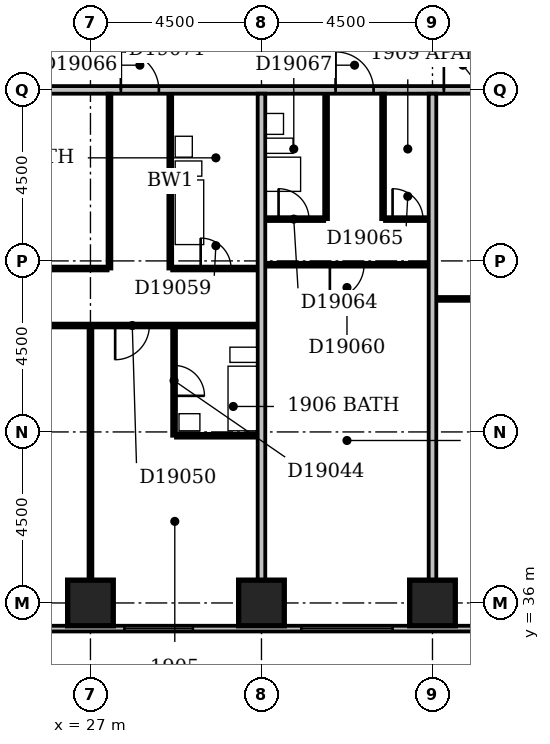
"""IFC4 building model, lengths in metres.
Left out: names, types, materials, properties, quantities, classifications, styles, units other than length and angle.
Written with IfcOpenShell. Run it as: python <this file> out.ifc"""

import sys

from ifc_helpers import new_model, si_unit, direction, frame, frame_2d, origin, origin_2d, place, context, subcontext, project, spatial, rectangle, extrude, element, fill, save


model = new_model("IFC4")
c1 = context("Model", 3, precision=1e-05, world=origin(), true_north=direction((0.0, 1.0)))
c2 = subcontext(c1, "Body", "Model", "MODEL_VIEW")
j1 = project(units=[si_unit("LENGTHUNIT", "METRE"), si_unit("PLANEANGLEUNIT", "RADIAN")], contexts=[c1])
p1 = place(None, origin())
s1 = spatial("IfcSite", under=j1, at=p1, CompositionType="ELEMENT")
p2 = place(p1, origin())
s2 = spatial("IfcBuilding", under=s1, at=p2, CompositionType="ELEMENT")
p3 = place(p2, frame((0.0, 0.0, 79.4)))
s3 = spatial("IfcBuildingStorey", under=s2, at=p3, CompositionType="ELEMENT", Elevation=79.4)
for number, where, z_axis, x_axis in (
    (1, (27.0, 36.0, -0.3), (0.0, 0.0, 1.0), (1.0, 0.0, 0.0)),
    (2, (31.5, 36.0, -0.3), (0.0, 0.0, 1.0), (1.0, 0.0, 0.0)),
    (3, (36.0, 36.0, -0.3), (0.0, 0.0, 1.0), (1.0, 0.0, 0.0)),
):
    element("IfcColumn", number, at=place(p3, frame(where, z_axis=z_axis, x_axis=x_axis)), inside=s3, PredefinedType="COLUMN", context=c2, shape_type="SweptSolid", body=[
        extrude(rectangle(XDim=1.2, YDim=1.2, at=origin_2d()), origin(), (0.0, 0.0, 1.0), 3.6),
    ])
p4 = place(p3, frame((23.1, 35.325, 0.0), z_axis=(0.0, 0.0, 1.0), x_axis=(1.0, 0.0, 0.0)))
e4 = element("IfcWall", 4, at=p4, inside=s3, PredefinedType="STANDARD", context=c2, shape_type="SweptSolid", body=[
    extrude(rectangle(XDim=45.15, YDim=0.15, at=frame_2d((22.575, 0.0))), origin(), (0.0, 0.0, 1.0), 2.7),
])
p5 = place(p4, frame((0.45, 0.0, 0.6)))
e5 = element("IfcOpeningElement", 5, at=p5, cuts=e4, PredefinedType="OPENING", context=c2, shape_type="SweptSolid", body=[
    extrude(rectangle(XDim=2.4, YDim=1.8, at=frame_2d((1.2, 0.9))), frame((0.0, 0.087, 0.0), z_axis=(0.0, -1.0, 0.0), x_axis=(1.0, 0.0, 0.0)), (0.0, 0.0, 1.0), 0.174),
])
p6 = place(p4, frame((4.793, 0.0, 0.6)))
e6 = element("IfcOpeningElement", 6, at=p6, cuts=e4, PredefinedType="OPENING", context=c2, shape_type="SweptSolid", body=[
    extrude(rectangle(XDim=1.8, YDim=1.8, at=frame_2d((0.9, 0.9))), frame((0.0, 0.087, 0.0), z_axis=(0.0, -1.0, 0.0), x_axis=(1.0, 0.0, 0.0)), (0.0, 0.0, 1.0), 0.174),
])
p7 = place(p4, frame((9.45, 0.0, 0.6)))
e7 = element("IfcOpeningElement", 7, at=p7, cuts=e4, PredefinedType="OPENING", context=c2, shape_type="SweptSolid", body=[
    extrude(rectangle(XDim=2.4, YDim=1.8, at=frame_2d((1.2, 0.9))), frame((0.0, 0.087, 0.0), z_axis=(0.0, -1.0, 0.0), x_axis=(1.0, 0.0, 0.0)), (0.0, 0.0, 1.0), 0.174),
])
p8 = place(p4, frame((13.95, 0.0, 0.6)))
e8 = element("IfcOpeningElement", 8, at=p8, cuts=e4, PredefinedType="OPENING", context=c2, shape_type="SweptSolid", body=[
    extrude(rectangle(XDim=2.4, YDim=1.8, at=frame_2d((1.2, 0.9))), frame((0.0, 0.087, 0.0), z_axis=(0.0, -1.0, 0.0), x_axis=(1.0, 0.0, 0.0)), (0.0, 0.0, 1.0), 0.174),
])
p9 = place(p4, frame((19.597, 0.0, 0.6)))
e9 = element("IfcOpeningElement", 9, at=p9, cuts=e4, PredefinedType="OPENING", context=c2, shape_type="SweptSolid", body=[
    extrude(rectangle(XDim=1.5, YDim=1.8, at=frame_2d((0.75, 0.9))), frame((0.0, 0.087, 0.0), z_axis=(0.0, -1.0, 0.0), x_axis=(1.0, 0.0, 0.0)), (0.0, 0.0, 1.0), 0.174),
])
p10 = place(p4, frame((22.95, 0.0, 0.6)))
e10 = element("IfcOpeningElement", 10, at=p10, cuts=e4, PredefinedType="OPENING", context=c2, shape_type="SweptSolid", body=[
    extrude(rectangle(XDim=2.4, YDim=1.8, at=frame_2d((1.2, 0.9))), frame((0.0, 0.087, 0.0), z_axis=(0.0, -1.0, 0.0), x_axis=(1.0, 0.0, 0.0)), (0.0, 0.0, 1.0), 0.174),
])
p11 = place(p4, frame((27.45, 0.0, 0.6)))
e11 = element("IfcOpeningElement", 11, at=p11, cuts=e4, PredefinedType="OPENING", context=c2, shape_type="SweptSolid", body=[
    extrude(rectangle(XDim=2.4, YDim=1.8, at=frame_2d((1.2, 0.9))), frame((0.0, 0.087, 0.0), z_axis=(0.0, -1.0, 0.0), x_axis=(1.0, 0.0, 0.0)), (0.0, 0.0, 1.0), 0.174),
])
p12 = place(p4, frame((31.95, 0.0, 0.6)))
e12 = element("IfcOpeningElement", 12, at=p12, cuts=e4, PredefinedType="OPENING", context=c2, shape_type="SweptSolid", body=[
    extrude(rectangle(XDim=2.4, YDim=1.8, at=frame_2d((1.2, 0.9))), frame((0.0, 0.087, 0.0), z_axis=(0.0, -1.0, 0.0), x_axis=(1.0, 0.0, 0.0)), (0.0, 0.0, 1.0), 0.174),
])
p13 = place(p4, frame((37.861, 0.0, 0.6)))
e13 = element("IfcOpeningElement", 13, at=p13, cuts=e4, PredefinedType="OPENING", context=c2, shape_type="SweptSolid", body=[
    extrude(rectangle(XDim=1.2, YDim=1.8, at=frame_2d((0.6, 0.9))), frame((0.0, 0.087, 0.0), z_axis=(0.0, -1.0, 0.0), x_axis=(1.0, 0.0, 0.0)), (0.0, 0.0, 1.0), 0.174),
])
p14 = place(p4, frame((40.95, 0.0, 0.6)))
e14 = element("IfcOpeningElement", 14, at=p14, cuts=e4, PredefinedType="OPENING", context=c2, shape_type="SweptSolid", body=[
    extrude(rectangle(XDim=2.4, YDim=1.8, at=frame_2d((1.2, 0.9))), frame((0.0, 0.087, 0.0), z_axis=(0.0, -1.0, 0.0), x_axis=(1.0, 0.0, 0.0)), (0.0, 0.0, 1.0), 0.174),
])
p15 = place(p3, frame((27.0, 36.6, 0.0), z_axis=(0.0, 0.0, 1.0), x_axis=(0.0, 1.0, 0.0)))
e15 = element("IfcWall", 15, at=p15, inside=s3, PredefinedType="PARTITIONING", context=c2, shape_type="SweptSolid", body=[
    extrude(rectangle(XDim=6.65, YDim=0.1, at=frame_2d((3.325, 0.0))), origin(), (0.0, 0.0, 1.0), 2.6),
])
p16 = place(p3, frame((31.5, 36.6, 0.0), z_axis=(0.0, 0.0, 1.0), x_axis=(0.0, 1.0, 0.0)))
e16 = element("IfcWall", 16, at=p16, inside=s3, PredefinedType="PARTITIONING", context=c2, shape_type="SweptSolid", body=[
    extrude(rectangle(XDim=12.8, YDim=0.2, at=frame_2d((6.4, 0.0))), origin(), (0.0, 0.0, 1.0), 3.3),
])
p17 = place(p3, frame((36.0, 36.6, 0.0), z_axis=(0.0, 0.0, 1.0), x_axis=(0.0, 1.0, 0.0)))
e17 = element("IfcWall", 17, at=p17, inside=s3, PredefinedType="PARTITIONING", context=c2, shape_type="SweptSolid", body=[
    extrude(rectangle(XDim=12.8, YDim=0.2, at=frame_2d((6.4, 0.0))), origin(), (0.0, 0.0, 1.0), 2.4),
])
p18 = place(p3, frame((29.2, 40.4, 0.0), z_axis=(0.0, 0.0, 1.0), x_axis=(0.0, 1.0, 0.0)))
e18 = element("IfcWall", 18, at=p18, inside=s3, PredefinedType="PLUMBINGWALL", context=c2, shape_type="SweptSolid", body=[
    extrude(rectangle(XDim=2.85, YDim=0.1, at=frame_2d((1.425, 0.0))), origin(), (0.0, 0.0, 1.0), 3.3),
])
p19 = place(p18, frame((1.05, 0.0, 0.0)))
e19 = element("IfcOpeningElement", 19, at=p19, cuts=e18, PredefinedType="OPENING", context=c2, shape_type="SweptSolid", body=[
    extrude(rectangle(XDim=0.8, YDim=2.1, at=frame_2d((0.4, 1.05))), frame((0.0, 0.062, 0.0), z_axis=(0.0, -1.0, 0.0), x_axis=(1.0, 0.0, 0.0)), (0.0, 0.0, 1.0), 0.124),
])
p20 = place(p3, frame((29.25, 40.4, 0.0), z_axis=(0.0, 0.0, 1.0), x_axis=(1.0, 0.0, 0.0)))
e20 = element("IfcWall", 20, at=p20, inside=s3, PredefinedType="PLUMBINGWALL", context=c2, shape_type="SweptSolid", body=[
    extrude(rectangle(XDim=2.15, YDim=0.1, at=frame_2d((1.075, 0.0))), origin(), (0.0, 0.0, 1.0), 3.3),
])
p21 = place(p3, frame((22.6, 43.3, 0.0), z_axis=(0.0, 0.0, 1.0), x_axis=(1.0, 0.0, 0.0)))
e21 = element("IfcWall", 21, at=p21, inside=s3, PredefinedType="PARTITIONING", context=c2, shape_type="SweptSolid", body=[
    extrude(rectangle(XDim=8.8, YDim=0.1, at=frame_2d((4.4, 0.0))), origin(), (0.0, 0.0, 1.0), 3.3),
])
p22 = place(p21, frame((1.7, 0.0, 0.0)))
e22 = element("IfcOpeningElement", 22, at=p22, cuts=e21, PredefinedType="OPENING", context=c2, shape_type="SweptSolid", body=[
    extrude(rectangle(XDim=0.9, YDim=2.1, at=frame_2d((0.45, 1.05))), frame((0.0, 0.062, 0.0), z_axis=(0.0, -1.0, 0.0), x_axis=(1.0, 0.0, 0.0)), (0.0, 0.0, 1.0), 0.124),
])
p23 = place(p21, frame((5.05, 0.0, 0.0)))
e23 = element("IfcOpeningElement", 23, at=p23, cuts=e21, PredefinedType="OPENING", context=c2, shape_type="SweptSolid", body=[
    extrude(rectangle(XDim=0.9, YDim=2.1, at=frame_2d((0.45, 1.05))), frame((0.0, 0.062, 0.0), z_axis=(0.0, -1.0, 0.0), x_axis=(1.0, 0.0, 0.0)), (0.0, 0.0, 1.0), 0.124),
])
p24 = place(p3, frame((36.1, 44.0, 0.0), z_axis=(0.0, 0.0, 1.0), x_axis=(1.0, 0.0, 0.0)))
e24 = element("IfcWall", 24, at=p24, inside=s3, PredefinedType="PARTITIONING", context=c2, shape_type="SweptSolid", body=[
    extrude(rectangle(XDim=13.3, YDim=0.1, at=frame_2d((6.65, 0.0))), origin(), (0.0, 0.0, 1.0), 3.3),
])
p25 = place(p24, frame((3.9, 0.0, 0.0)))
e25 = element("IfcOpeningElement", 25, at=p25, cuts=e24, PredefinedType="OPENING", context=c2, shape_type="SweptSolid", body=[
    extrude(rectangle(XDim=0.9, YDim=2.1, at=frame_2d((0.45, 1.05))), frame((0.0, 0.062, 0.0), z_axis=(0.0, -1.0, 0.0), x_axis=(1.0, 0.0, 0.0)), (0.0, 0.0, 1.0), 0.124),
])
p26 = place(p24, frame((10.7, 0.0, 0.0)))
e26 = element("IfcOpeningElement", 26, at=p26, cuts=e24, PredefinedType="OPENING", context=c2, shape_type="SweptSolid", body=[
    extrude(rectangle(XDim=0.9, YDim=2.1, at=frame_2d((0.45, 1.05))), frame((0.0, 0.062, 0.0), z_axis=(0.0, -1.0, 0.0), x_axis=(1.0, 0.0, 0.0)), (0.0, 0.0, 1.0), 0.124),
])
p27 = place(p3, frame((22.6, 44.8, 0.0), z_axis=(0.0, 0.0, 1.0), x_axis=(1.0, 0.0, 0.0)))
e27 = element("IfcWall", 27, at=p27, inside=s3, PredefinedType="PARTITIONING", context=c2, shape_type="SweptSolid", body=[
    extrude(rectangle(XDim=4.85, YDim=0.1, at=frame_2d((2.425, 0.0))), origin(), (0.0, 0.0, 1.0), 3.3),
])
p28 = place(p27, frame((1.95, 0.0, 0.0)))
e28 = element("IfcOpeningElement", 28, at=p28, cuts=e27, PredefinedType="OPENING", context=c2, shape_type="SweptSolid", body=[
    extrude(rectangle(XDim=0.9, YDim=2.1, at=frame_2d((0.45, 1.05))), frame((0.0, 0.062, 0.0), z_axis=(0.0, -1.0, 0.0), x_axis=(1.0, 0.0, 0.0)), (0.0, 0.0, 1.0), 0.124),
])
p29 = place(p3, frame((27.5, 44.8, 0.0), z_axis=(0.0, 0.0, 1.0), x_axis=(0.0, 1.0, 0.0)))
e29 = element("IfcWall", 29, at=p29, inside=s3, PredefinedType="PARTITIONING", context=c2, shape_type="SweptSolid", body=[
    extrude(rectangle(XDim=4.6, YDim=0.1, at=frame_2d((2.3, 0.0))), origin(), (0.0, 0.0, 1.0), 2.6),
])
p30 = place(p3, frame((29.1, 44.8, 0.0), z_axis=(0.0, 0.0, 1.0), x_axis=(0.0, 1.0, 0.0)))
e30 = element("IfcWall", 30, at=p30, inside=s3, PredefinedType="PLUMBINGWALL", context=c2, shape_type="SweptSolid", body=[
    extrude(rectangle(XDim=4.6, YDim=0.1, at=frame_2d((2.3, 0.0))), origin(), (0.0, 0.0, 1.0), 3.3),
])
p31 = place(p3, frame((29.15, 44.8, 0.0), z_axis=(0.0, 0.0, 1.0), x_axis=(1.0, 0.0, 0.0)))
e31 = element("IfcWall", 31, at=p31, inside=s3, PredefinedType="PARTITIONING", context=c2, shape_type="SweptSolid", body=[
    extrude(rectangle(XDim=2.25, YDim=0.1, at=frame_2d((1.125, 0.0))), origin(), (0.0, 0.0, 1.0), 3.3),
])
p32 = place(p31, frame((0.75, 0.0, 0.0)))
e32 = element("IfcOpeningElement", 32, at=p32, cuts=e31, PredefinedType="OPENING", context=c2, shape_type="SweptSolid", body=[
    extrude(rectangle(XDim=0.8, YDim=2.1, at=frame_2d((0.4, 1.05))), frame((0.0, 0.062, 0.0), z_axis=(0.0, -1.0, 0.0), x_axis=(1.0, 0.0, 0.0)), (0.0, 0.0, 1.0), 0.124),
])
p33 = place(p3, frame((31.6, 44.9, 0.0), z_axis=(0.0, 0.0, 1.0), x_axis=(1.0, 0.0, 0.0)))
e33 = element("IfcWall", 33, at=p33, inside=s3, PredefinedType="PARTITIONING", context=c2, shape_type="SweptSolid", body=[
    extrude(rectangle(XDim=4.3, YDim=0.1, at=frame_2d((2.15, 0.0))), origin(), (0.0, 0.0, 1.0), 3.3),
])
p34 = place(p33, frame((1.7, 0.0, 0.0)))
e34 = element("IfcOpeningElement", 34, at=p34, cuts=e33, PredefinedType="OPENING", context=c2, shape_type="SweptSolid", body=[
    extrude(rectangle(XDim=0.9, YDim=2.1, at=frame_2d((0.45, 1.05))), frame((0.0, 0.062, 0.0), z_axis=(0.0, -1.0, 0.0), x_axis=(1.0, 0.0, 0.0)), (0.0, 0.0, 1.0), 0.124),
])
p35 = place(p3, frame((31.6, 46.1, 0.0), z_axis=(0.0, 0.0, 1.0), x_axis=(1.0, 0.0, 0.0)))
e35 = element("IfcWall", 35, at=p35, inside=s3, PredefinedType="PARTITIONING", context=c2, shape_type="SweptSolid", body=[
    extrude(rectangle(XDim=1.55, YDim=0.1, at=frame_2d((0.775, 0.0))), origin(), (0.0, 0.0, 1.0), 3.3),
])
p36 = place(p35, frame((0.35, 0.0, 0.0)))
e36 = element("IfcOpeningElement", 36, at=p36, cuts=e35, PredefinedType="OPENING", context=c2, shape_type="SweptSolid", body=[
    extrude(rectangle(XDim=0.8, YDim=2.1, at=frame_2d((0.4, 1.05))), frame((0.0, 0.062, 0.0), z_axis=(0.0, -1.0, 0.0), x_axis=(1.0, 0.0, 0.0)), (0.0, 0.0, 1.0), 0.124),
])
p37 = place(p3, frame((33.2, 46.1, 0.0), z_axis=(0.0, 0.0, 1.0), x_axis=(0.0, 1.0, 0.0)))
e37 = element("IfcWall", 37, at=p37, inside=s3, PredefinedType="PLUMBINGWALL", context=c2, shape_type="SweptSolid", body=[
    extrude(rectangle(XDim=3.3, YDim=0.1, at=frame_2d((1.65, 0.0))), origin(), (0.0, 0.0, 1.0), 3.3),
])
p38 = place(p3, frame((34.7, 46.1, 0.0), z_axis=(0.0, 0.0, 1.0), x_axis=(0.0, 1.0, 0.0)))
e38 = element("IfcWall", 38, at=p38, inside=s3, PredefinedType="PARTITIONING", context=c2, shape_type="SweptSolid", body=[
    extrude(rectangle(XDim=3.3, YDim=0.1, at=frame_2d((1.65, 0.0))), origin(), (0.0, 0.0, 1.0), 3.3),
])
p39 = place(p3, frame((34.75, 46.1, 0.0), z_axis=(0.0, 0.0, 1.0), x_axis=(1.0, 0.0, 0.0)))
e39 = element("IfcWall", 39, at=p39, inside=s3, PredefinedType="PARTITIONING", context=c2, shape_type="SweptSolid", body=[
    extrude(rectangle(XDim=1.15, YDim=0.1, at=frame_2d((0.575, 0.0))), origin(), (0.0, 0.0, 1.0), 3.3),
])
p40 = place(p39, frame((0.2, 0.0, 0.0)))
e40 = element("IfcOpeningElement", 40, at=p40, cuts=e39, PredefinedType="OPENING", context=c2, shape_type="SweptSolid", body=[
    extrude(rectangle(XDim=0.8, YDim=2.1, at=frame_2d((0.4, 1.05))), frame((0.0, 0.062, 0.0), z_axis=(0.0, -1.0, 0.0), x_axis=(1.0, 0.0, 0.0)), (0.0, 0.0, 1.0), 0.124),
])
p41 = place(p3, frame((9.1, 49.5, 0.0), z_axis=(0.0, 0.0, 1.0), x_axis=(1.0, 0.0, 0.0)))
e41 = element("IfcWall", 41, at=p41, inside=s3, PredefinedType="PARTITIONING", context=c2, shape_type="SweptSolid", body=[
    extrude(rectangle(XDim=57.8, YDim=0.2, at=frame_2d((28.9, 0.0))), origin(), (0.0, 0.0, 1.0), 3.3),
])
p42 = place(p41, frame((18.7, 0.0, 0.0)))
e42 = element("IfcOpeningElement", 42, at=p42, cuts=e41, PredefinedType="OPENING", context=c2, shape_type="SweptSolid", body=[
    extrude(rectangle(XDim=1.0, YDim=2.1, at=frame_2d((0.5, 1.05))), frame((0.0, 0.112, 0.0), z_axis=(0.0, -1.0, 0.0), x_axis=(1.0, 0.0, 0.0)), (0.0, 0.0, 1.0), 0.224),
])
p43 = place(p41, frame((24.35, 0.0, 0.0)))
e43 = element("IfcOpeningElement", 43, at=p43, cuts=e41, PredefinedType="OPENING", context=c2, shape_type="SweptSolid", body=[
    extrude(rectangle(XDim=1.0, YDim=2.1, at=frame_2d((0.5, 1.05))), frame((0.0, 0.112, 0.0), z_axis=(0.0, -1.0, 0.0), x_axis=(1.0, 0.0, 0.0)), (0.0, 0.0, 1.0), 0.224),
])
p44 = place(p41, frame((27.2, 0.0, 0.0)))
e44 = element("IfcOpeningElement", 44, at=p44, cuts=e41, PredefinedType="OPENING", context=c2, shape_type="SweptSolid", body=[
    extrude(rectangle(XDim=1.0, YDim=2.1, at=frame_2d((0.5, 1.05))), frame((0.0, 0.112, 0.0), z_axis=(0.0, -1.0, 0.0), x_axis=(1.0, 0.0, 0.0)), (0.0, 0.0, 1.0), 0.224),
])
p45 = place(p41, frame((43.1, 0.0, 0.0)))
e45 = element("IfcOpeningElement", 45, at=p45, cuts=e41, PredefinedType="OPENING", context=c2, shape_type="SweptSolid", body=[
    extrude(rectangle(XDim=1.0, YDim=2.1, at=frame_2d((0.5, 1.05))), frame((0.0, 0.112, 0.0), z_axis=(0.0, -1.0, 0.0), x_axis=(1.0, 0.0, 0.0)), (0.0, 0.0, 1.0), 0.224),
])
p46 = place(p41, frame((3.9, 0.0, 0.0)))
e46 = element("IfcOpeningElement", 46, at=p46, cuts=e41, PredefinedType="OPENING", context=c2, shape_type="SweptSolid", body=[
    extrude(rectangle(XDim=0.9, YDim=2.1, at=frame_2d((0.45, 1.05))), frame((0.0, 0.112, 0.0), z_axis=(0.0, -1.0, 0.0), x_axis=(1.0, 0.0, 0.0)), (0.0, 0.0, 1.0), 0.224),
])
p47 = place(p6, origin())
e47 = element("IfcWindow", 47, at=p47, inside=s3, PartitioningType="SINGLE_PANEL", PredefinedType="WINDOW", context=c2, shape_type="SweptSolid", body=[
    extrude(rectangle(XDim=1.8, YDim=1.8, at=frame_2d((0.9, 0.9))), frame((0.0, 0.03, 0.0), z_axis=(0.0, -1.0, 0.0), x_axis=(1.0, 0.0, 0.0)), (0.0, 0.0, 1.0), 0.06),
])
fill(e6, e47)
p48 = place(p7, origin())
e48 = element("IfcWindow", 48, at=p48, inside=s3, PartitioningType="SINGLE_PANEL", PredefinedType="WINDOW", context=c2, shape_type="SweptSolid", body=[
    extrude(rectangle(XDim=2.4, YDim=1.8, at=frame_2d((1.2, 0.9))), frame((0.0, 0.03, 0.0), z_axis=(0.0, -1.0, 0.0), x_axis=(1.0, 0.0, 0.0)), (0.0, 0.0, 1.0), 0.06),
])
fill(e7, e48)
p49 = place(p19, frame((0.8, 0.0, 0.0), z_axis=(0.0, 0.0, 1.0), x_axis=(-1.0, 0.0, 0.0)))
e49 = element("IfcDoor", 49, at=p49, inside=s3, OperationType="SINGLE_SWING_RIGHT", PredefinedType="DOOR", context=c2, shape_type="SweptSolid", body=[
    extrude(rectangle(XDim=0.8, YDim=2.1, at=frame_2d((0.4, 1.05))), frame((0.0, 0.025, 0.0), z_axis=(0.0, -1.0, 0.0), x_axis=(1.0, 0.0, 0.0)), (0.0, 0.0, 1.0), 0.05),
])
fill(e19, e49)
p50 = place(p23, frame((0.9, 0.0, 0.0), z_axis=(0.0, 0.0, 1.0), x_axis=(-1.0, 0.0, 0.0)))
e50 = element("IfcDoor", 50, at=p50, inside=s3, OperationType="SINGLE_SWING_RIGHT", PredefinedType="DOOR", context=c2, shape_type="SweptSolid", body=[
    extrude(rectangle(XDim=0.9, YDim=2.1, at=frame_2d((0.45, 1.05))), frame((0.0, 0.025, 0.0), z_axis=(0.0, -1.0, 0.0), x_axis=(1.0, 0.0, 0.0)), (0.0, 0.0, 1.0), 0.05),
])
fill(e23, e50)
p51 = place(p32, origin())
e51 = element("IfcDoor", 51, at=p51, inside=s3, OperationType="SINGLE_SWING_LEFT", PredefinedType="DOOR", context=c2, shape_type="SweptSolid", body=[
    extrude(rectangle(XDim=0.8, YDim=2.1, at=frame_2d((0.4, 1.05))), frame((0.0, 0.025, 0.0), z_axis=(0.0, -1.0, 0.0), x_axis=(1.0, 0.0, 0.0)), (0.0, 0.0, 1.0), 0.05),
])
fill(e32, e51)
p52 = place(p34, frame((0.9, 0.0, 0.0), z_axis=(0.0, 0.0, 1.0), x_axis=(-1.0, 0.0, 0.0)))
e52 = element("IfcDoor", 52, at=p52, inside=s3, OperationType="SINGLE_SWING_RIGHT", PredefinedType="DOOR", context=c2, shape_type="SweptSolid", body=[
    extrude(rectangle(XDim=0.9, YDim=2.1, at=frame_2d((0.45, 1.05))), frame((0.0, 0.025, 0.0), z_axis=(0.0, -1.0, 0.0), x_axis=(1.0, 0.0, 0.0)), (0.0, 0.0, 1.0), 0.05),
])
fill(e34, e52)
p53 = place(p36, origin())
e53 = element("IfcDoor", 53, at=p53, inside=s3, OperationType="SINGLE_SWING_LEFT", PredefinedType="DOOR", context=c2, shape_type="SweptSolid", body=[
    extrude(rectangle(XDim=0.8, YDim=2.1, at=frame_2d((0.4, 1.05))), frame((0.0, 0.025, 0.0), z_axis=(0.0, -1.0, 0.0), x_axis=(1.0, 0.0, 0.0)), (0.0, 0.0, 1.0), 0.05),
])
fill(e36, e53)
p54 = place(p40, origin())
e54 = element("IfcDoor", 54, at=p54, inside=s3, OperationType="SINGLE_SWING_LEFT", PredefinedType="DOOR", context=c2, shape_type="SweptSolid", body=[
    extrude(rectangle(XDim=0.8, YDim=2.1, at=frame_2d((0.4, 1.05))), frame((0.0, 0.025, 0.0), z_axis=(0.0, -1.0, 0.0), x_axis=(1.0, 0.0, 0.0)), (0.0, 0.0, 1.0), 0.05),
])
fill(e40, e54)
p55 = place(p42, origin())
e55 = element("IfcDoor", 55, at=p55, inside=s3, OperationType="SINGLE_SWING_LEFT", PredefinedType="DOOR", context=c2, shape_type="SweptSolid", body=[
    extrude(rectangle(XDim=1.0, YDim=2.1, at=frame_2d((0.5, 1.05))), frame((0.0, 0.025, 0.0), z_axis=(0.0, -1.0, 0.0), x_axis=(1.0, 0.0, 0.0)), (0.0, 0.0, 1.0), 0.05),
])
fill(e42, e55)
p56 = place(p43, origin())
e56 = element("IfcDoor", 56, at=p56, inside=s3, OperationType="SINGLE_SWING_LEFT", PredefinedType="DOOR", context=c2, shape_type="SweptSolid", body=[
    extrude(rectangle(XDim=1.0, YDim=2.1, at=frame_2d((0.5, 1.05))), frame((0.0, 0.025, 0.0), z_axis=(0.0, -1.0, 0.0), x_axis=(1.0, 0.0, 0.0)), (0.0, 0.0, 1.0), 0.05),
])
fill(e43, e56)
p57 = place(p44, origin())
e57 = element("IfcDoor", 57, at=p57, inside=s3, OperationType="SINGLE_SWING_LEFT", PredefinedType="DOOR", context=c2, shape_type="SweptSolid", body=[
    extrude(rectangle(XDim=1.0, YDim=2.1, at=frame_2d((0.5, 1.05))), frame((0.0, 0.025, 0.0), z_axis=(0.0, -1.0, 0.0), x_axis=(1.0, 0.0, 0.0)), (0.0, 0.0, 1.0), 0.05),
])
fill(e44, e57)
save(model, sys.argv[1])
